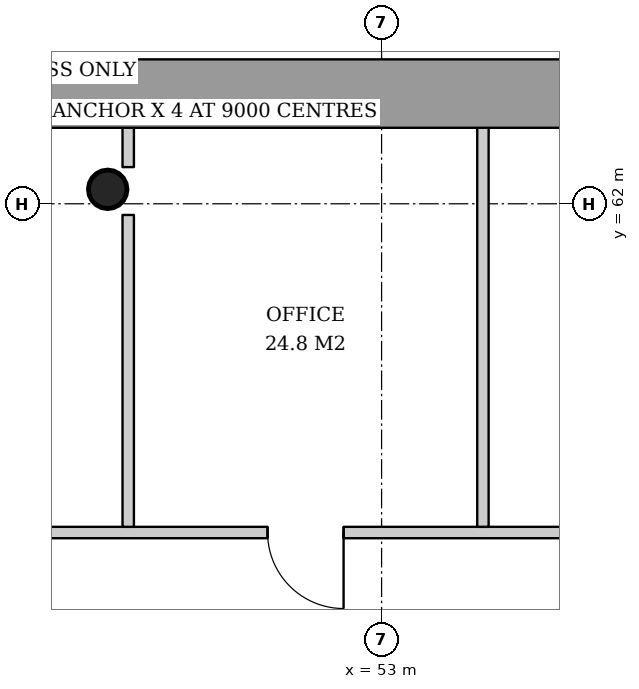
"""IFC4 building model, lengths in metres.
Left out: names, types, materials, properties, quantities, classifications, styles, units other than length and angle.
Written with IfcOpenShell. Run it as: python <this file> out.ifc"""

import sys

from ifc_helpers import new_model, si_unit, direction, frame, frame_2d, origin, origin_2d, place, context, subcontext, project, spatial, rectangle, hollow_circle, extrude, element, fill, save


model = new_model("IFC4")
c1 = context("Model", 3, precision=1e-05, world=origin(), true_north=direction((0.0, 1.0)))
c2 = subcontext(c1, "Body", "Model", "MODEL_VIEW")
j1 = project(units=[si_unit("LENGTHUNIT", "METRE"), si_unit("PLANEANGLEUNIT", "RADIAN")], contexts=[c1])
p1 = place(None, origin())
s1 = spatial("IfcSite", under=j1, at=p1, CompositionType="ELEMENT")
p2 = place(p1, origin())
s2 = spatial("IfcBuilding", under=s1, at=p2, CompositionType="ELEMENT")
p3 = place(p2, frame((0.0, 0.0, 264.2)))
s3 = spatial("IfcBuildingStorey", under=s2, at=p3, CompositionType="ELEMENT", Elevation=264.2)
p4 = place(p3, frame((49.409, 62.229, 0.0), z_axis=(-0.010594712125, -0.031912557129, 0.999434510497), x_axis=(0.949064523485, -0.315081783451, 0.0)))
e1 = element("IfcColumn", 1, at=p4, inside=s3, PredefinedType="COLUMN", context=c2, shape_type="SweptSolid", body=[
    extrude(hollow_circle(Radius=0.254, WallThickness=0.02, at=origin_2d()), origin(), (0.0, 0.0, 1.0), 3.802),
])
p5 = place(p3, frame((56.416, 57.675, 0.0), z_axis=(0.0, 0.0, 1.0), x_axis=(-1.0, 0.0, 0.0)))
e2 = element("IfcWall", 2, at=p5, inside=s3, PredefinedType="PARTITIONING", context=c2, shape_type="SweptSolid", body=[
    extrude(rectangle(XDim=22.832, YDim=0.15, at=frame_2d((11.416, 0.0))), origin(), (0.0, 0.0, 1.0), 3.02),
])
p6 = place(p5, frame((3.916, 0.0, 0.0)))
e3 = element("IfcOpeningElement", 3, at=p6, cuts=e2, PredefinedType="OPENING", context=c2, shape_type="SweptSolid", body=[
    extrude(rectangle(XDim=1.0, YDim=2.1, at=frame_2d((0.5, 1.05))), frame((0.0, 0.085, 0.0), z_axis=(0.0, -1.0, 0.0), x_axis=(1.0, 0.0, 0.0)), (0.0, 0.0, 1.0), 0.17),
])
p7 = place(p5, frame((8.182, 0.0, 0.0)))
e4 = element("IfcOpeningElement", 4, at=p7, cuts=e2, PredefinedType="OPENING", context=c2, shape_type="SweptSolid", body=[
    extrude(rectangle(XDim=1.8, YDim=2.4, at=frame_2d((0.9, 1.2))), frame((0.0, 0.085, 0.0), z_axis=(0.0, -1.0, 0.0), x_axis=(1.0, 0.0, 0.0)), (0.0, 0.0, 1.0), 0.17),
])
p8 = place(p5, frame((17.916, 0.0, 0.0)))
e5 = element("IfcOpeningElement", 5, at=p8, cuts=e2, PredefinedType="OPENING", context=c2, shape_type="SweptSolid", body=[
    extrude(rectangle(XDim=1.0, YDim=2.1, at=frame_2d((0.5, 1.05))), frame((0.0, 0.085, 0.0), z_axis=(0.0, -1.0, 0.0), x_axis=(1.0, 0.0, 0.0)), (0.0, 0.0, 1.0), 0.17),
])
p9 = place(p3, frame((54.333, 57.75, 0.0), z_axis=(0.0, 0.0, 1.0), x_axis=(0.0, 1.0, 0.0)))
e6 = element("IfcWall", 6, at=p9, inside=s3, PredefinedType="PARTITIONING", context=c2, shape_type="SweptSolid", body=[
    extrude(rectangle(XDim=5.29, YDim=0.15, at=frame_2d((2.645, 0.0))), origin(), (0.0, 0.0, 1.0), 3.12),
])
p10 = place(p3, frame((49.667, 57.75, 0.0), z_axis=(0.0, 0.0, 1.0), x_axis=(0.0, 1.0, 0.0)))
e7 = element("IfcWall", 7, at=p10, inside=s3, PredefinedType="PARTITIONING", context=c2, shape_type="SweptSolid", body=[
    extrude(rectangle(XDim=4.103, YDim=0.15, at=frame_2d((2.052, 0.0))), origin(), (0.0, 0.0, 1.0), 3.62),
])
p11 = place(p3, frame((49.667, 62.483, 0.0), z_axis=(0.0, 0.0, 1.0), x_axis=(0.0, 1.0, 0.0)))
e8 = element("IfcWall", 8, at=p11, inside=s3, PredefinedType="PARTITIONING", context=c2, shape_type="SweptSolid", body=[
    extrude(rectangle(XDim=0.557, YDim=0.15, at=frame_2d((0.279, 0.0))), origin(), (0.0, 0.0, 1.0), 3.62),
])
p12 = place(p6, origin())
e9 = element("IfcDoor", 9, at=p12, inside=s3, OperationType="SINGLE_SWING_LEFT", PredefinedType="DOOR", context=c2, shape_type="SweptSolid", body=[
    extrude(rectangle(XDim=1.0, YDim=2.1, at=frame_2d((0.5, 1.05))), frame((0.0, 0.025, 0.0), z_axis=(0.0, -1.0, 0.0), x_axis=(1.0, 0.0, 0.0)), (0.0, 0.0, 1.0), 0.05),
])
fill(e3, e9)
save(model, sys.argv[1])
